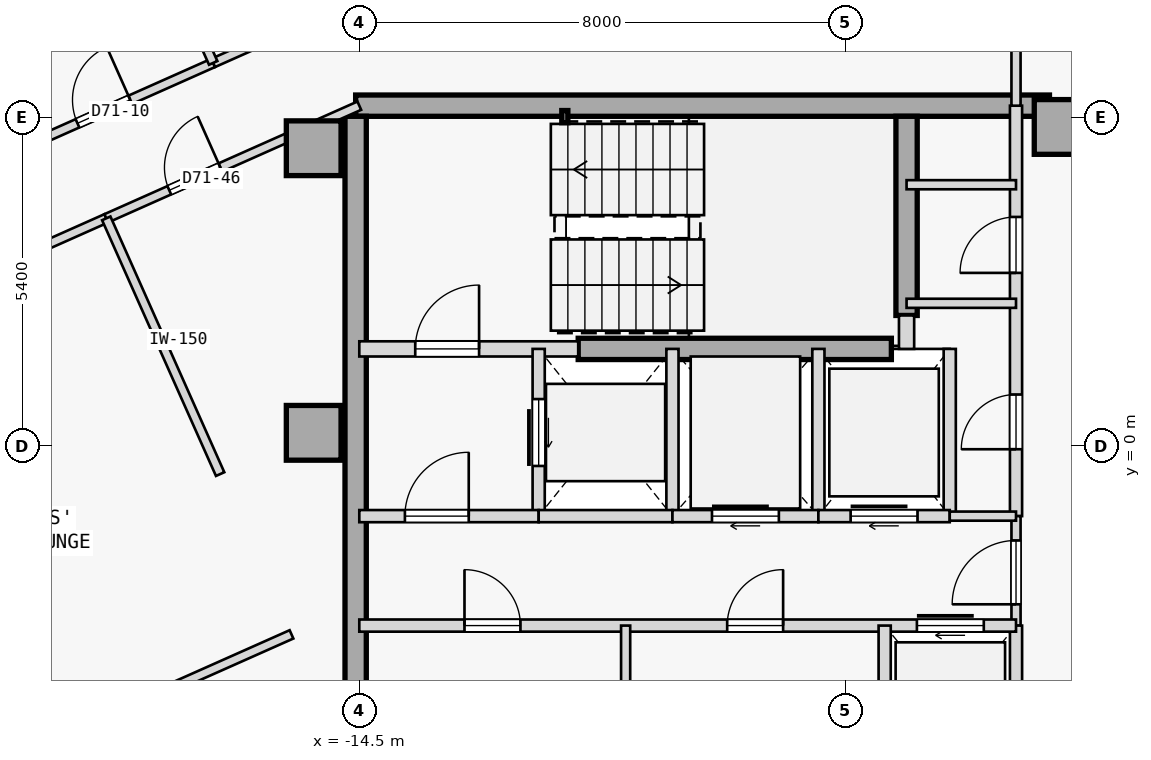
"""IFC4 building model, lengths in metres.
Left out: names, types, materials, properties, quantities, classifications, styles, units other than length and angle.
Written with IfcOpenShell. Run it as: python <this file> out.ifc"""

import sys

from ifc_helpers import new_model, si_unit, direction, frame, frame_2d, origin, origin_2d, place, context, subcontext, project, spatial, rectangle, hollow_rectangle, extrude, element, fill, save


model = new_model("IFC4")
c1 = context("Model", 3, precision=1e-05, world=origin(), true_north=direction((0.0, 1.0)))
c2 = subcontext(c1, "Body", "Model", "MODEL_VIEW")
j1 = project(units=[si_unit("LENGTHUNIT", "METRE"), si_unit("PLANEANGLEUNIT", "RADIAN")], contexts=[c1])
p1 = place(None, origin())
s1 = spatial("IfcSite", under=j1, at=p1, CompositionType="ELEMENT")
p2 = place(p1, origin())
s2 = spatial("IfcBuilding", under=s1, at=p2, CompositionType="ELEMENT")
p3 = place(p2, frame((0.0, 0.0, 265.55)))
s3 = spatial("IfcBuildingStorey", under=s2, at=p3, CompositionType="ELEMENT", Elevation=265.55)
for number, where, z_axis, x_axis in (
    (1, (-15.25, 4.9, 0.0), (0.0, 0.0, 1.0), (1.0, 0.0, 0.0)),
    (2, (-15.25, 0.22, 0.0), (0.0, 0.0, 1.0), (1.0, 0.0, 0.0)),
    (3, (-2.95, 5.25, 0.0), (0.0, 0.0, 1.0), (1.0, 0.0, 0.0)),
):
    element("IfcColumn", number, at=place(p3, frame(where, z_axis=z_axis, x_axis=x_axis)), inside=s3, PredefinedType="COLUMN", context=c2, shape_type="SweptSolid", body=[
        extrude(rectangle(XDim=0.9, YDim=0.9, at=origin_2d()), origin(), (0.0, 0.0, 1.0), 3.35),
    ])
p4 = place(p3, frame((-14.56, 5.6, 0.0), z_axis=(0.0, 0.0, 1.0), x_axis=(1.0, 0.0, 0.0)))
e4 = element("IfcWall", 4, at=p4, inside=s3, PredefinedType="SHEAR", context=c2, shape_type="SweptSolid", body=[
    extrude(rectangle(XDim=11.41, YDim=0.35, at=frame_2d((5.705, 0.0))), origin(), (0.0, 0.0, 1.0), 3.125),
])
p5 = place(p3, frame((-14.56, -5.425, 0.0), z_axis=(0.0, 0.0, 1.0), x_axis=(0.0, 1.0, 0.0)))
e5 = element("IfcWall", 5, at=p5, inside=s3, PredefinedType="SHEAR", context=c2, shape_type="SweptSolid", body=[
    extrude(rectangle(XDim=10.85, YDim=0.35, at=frame_2d((5.425, 0.0))), origin(), (0.0, 0.0, 1.0), 3.125),
])
p6 = place(p3, frame((-5.5, 2.15, 0.0), z_axis=(0.0, 0.0, 1.0), x_axis=(0.0, 1.0, 0.0)))
e6 = element("IfcWall", 6, at=p6, inside=s3, PredefinedType="SHEAR", context=c2, shape_type="SweptSolid", body=[
    extrude(rectangle(XDim=3.275, YDim=0.35, at=frame_2d((1.638, 0.0))), origin(), (0.0, 0.0, 1.0), 3.125),
])
p7 = place(p3, frame((-10.9, 1.6, 0.0), z_axis=(0.0, 0.0, 1.0), x_axis=(1.0, 0.0, 0.0)))
e7 = element("IfcWall", 7, at=p7, inside=s3, PredefinedType="SHEAR", context=c2, shape_type="SweptSolid", body=[
    extrude(rectangle(XDim=5.15, YDim=0.35, at=frame_2d((2.575, 0.0))), origin(), (0.0, 0.0, 1.0), 3.125),
])
p8 = place(p3, frame((-11.12, 5.42, 0.0), z_axis=(0.0, 0.0, 1.0), x_axis=(1.0, 0.0, 0.0)))
e8 = element("IfcColumn", 8, at=p8, inside=s3, PredefinedType="COLUMN", context=c2, shape_type="SweptSolid", body=[
    extrude(hollow_rectangle(XDim=0.1, YDim=0.2, WallThickness=0.008, at=origin_2d()), origin(), (0.0, 0.0, 1.0), 3.35),
])
p9 = place(p3, frame((-14.5, 1.6, 0.0), z_axis=(0.0, 0.0, 1.0), x_axis=(1.0, 0.0, 0.0)))
e9 = element("IfcWall", 9, at=p9, inside=s3, PredefinedType="STANDARD", context=c2, shape_type="SweptSolid", body=[
    extrude(rectangle(XDim=3.6, YDim=0.25, at=frame_2d((1.8, 0.0))), origin(), (0.0, 0.0, 1.0), 3.125),
])
p10 = place(p9, frame((0.92, 0.0, 0.0)))
e10 = element("IfcOpeningElement", 10, at=p10, cuts=e9, PredefinedType="OPENING", context=c2, shape_type="SweptSolid", body=[
    extrude(rectangle(XDim=1.05, YDim=2.15, at=frame_2d((0.525, 1.075))), frame((0.0, 0.135, 0.0), z_axis=(0.0, -1.0, 0.0), x_axis=(1.0, 0.0, 0.0)), (0.0, 0.0, 1.0), 0.27),
])
p11 = place(p3, frame((-5.5, 1.6, 0.0), z_axis=(0.0, 0.0, 1.0), x_axis=(0.0, 1.0, 0.0)))
e11 = element("IfcWall", 11, at=p11, inside=s3, PredefinedType="STANDARD", context=c2, shape_type="SweptSolid", body=[
    extrude(rectangle(XDim=0.55, YDim=0.25, at=frame_2d((0.275, 0.0))), origin(), (0.0, 0.0, 1.0), 3.125),
])
p12 = place(p3, frame((-3.7, -1.15, 0.0), z_axis=(0.0, 0.0, 1.0), x_axis=(0.0, 1.0, 0.0)))
e12 = element("IfcWall", 12, at=p12, inside=s3, PredefinedType="STANDARD", context=c2, shape_type="SweptSolid", body=[
    extrude(rectangle(XDim=6.75, YDim=0.2, at=frame_2d((3.375, 0.0))), origin(), (0.0, 0.0, 1.0), 3.125),
])
p13 = place(p12, frame((1.1, 0.0, 0.0)))
e13 = element("IfcOpeningElement", 13, at=p13, cuts=e12, PredefinedType="OPENING", context=c2, shape_type="SweptSolid", body=[
    extrude(rectangle(XDim=0.9, YDim=2.15, at=frame_2d((0.45, 1.075))), frame((0.0, 0.11, 0.0), z_axis=(0.0, -1.0, 0.0), x_axis=(1.0, 0.0, 0.0)), (0.0, 0.0, 1.0), 0.22),
])
p14 = place(p12, frame((4.0, 0.0, 0.0)))
e14 = element("IfcOpeningElement", 14, at=p14, cuts=e12, PredefinedType="OPENING", context=c2, shape_type="SweptSolid", body=[
    extrude(rectangle(XDim=0.92, YDim=2.15, at=frame_2d((0.46, 1.075))), frame((0.0, 0.11, 0.0), z_axis=(0.0, -1.0, 0.0), x_axis=(1.0, 0.0, 0.0)), (0.0, 0.0, 1.0), 0.22),
])
p15 = place(p3, frame((-3.7, -2.95, 0.0), z_axis=(0.0, 0.0, 1.0), x_axis=(0.0, 1.0, 0.0)))
e15 = element("IfcWall", 15, at=p15, inside=s3, PredefinedType="PARTITIONING", context=c2, shape_type="SweptSolid", body=[
    extrude(rectangle(XDim=1.8, YDim=0.15, at=frame_2d((0.9, 0.0))), origin(), (0.0, 0.0, 1.0), 3.125),
])
p16 = place(p15, frame((0.35, 0.0, 0.0)))
e16 = element("IfcOpeningElement", 16, at=p16, cuts=e15, PredefinedType="OPENING", context=c2, shape_type="SweptSolid", body=[
    extrude(rectangle(XDim=1.05, YDim=2.18, at=frame_2d((0.525, 1.09))), frame((0.0, 0.085, 0.0), z_axis=(0.0, -1.0, 0.0), x_axis=(1.0, 0.0, 0.0)), (0.0, 0.0, 1.0), 0.17),
])
p17 = place(p3, frame((-3.7, -5.6, 0.0), z_axis=(0.0, 0.0, 1.0), x_axis=(0.0, 1.0, 0.0)))
e17 = element("IfcWall", 17, at=p17, inside=s3, PredefinedType="STANDARD", context=c2, shape_type="SweptSolid", body=[
    extrude(rectangle(XDim=2.65, YDim=0.2, at=frame_2d((1.325, 0.0))), origin(), (0.0, 0.0, 1.0), 3.125),
])
p18 = place(p3, frame((-11.55, -1.15, 0.0), z_axis=(0.0, 0.0, 1.0), x_axis=(0.0, 1.0, 0.0)))
e18 = element("IfcWall", 18, at=p18, inside=s3, PredefinedType="STANDARD", context=c2, shape_type="SweptSolid", body=[
    extrude(rectangle(XDim=2.75, YDim=0.2, at=frame_2d((1.375, 0.0))), origin(), (0.0, 0.0, 1.0), 3.125),
])
p19 = place(p18, frame((0.825, 0.0, 0.0)))
e19 = element("IfcOpeningElement", 19, at=p19, cuts=e18, PredefinedType="OPENING", context=c2, shape_type="SweptSolid", body=[
    extrude(rectangle(XDim=1.1, YDim=2.15, at=frame_2d((0.55, 1.075))), frame((0.0, 0.11, 0.0), z_axis=(0.0, -1.0, 0.0), x_axis=(1.0, 0.0, 0.0)), (0.0, 0.0, 1.0), 0.22),
])
p20 = place(p3, frame((-9.35, -1.15, 0.0), z_axis=(0.0, 0.0, 1.0), x_axis=(0.0, 1.0, 0.0)))
e20 = element("IfcWall", 20, at=p20, inside=s3, PredefinedType="STANDARD", context=c2, shape_type="SweptSolid", body=[
    extrude(rectangle(XDim=2.75, YDim=0.2, at=frame_2d((1.375, 0.0))), origin(), (0.0, 0.0, 1.0), 3.125),
])
p21 = place(p3, frame((-14.5, -1.15, 0.0), z_axis=(0.0, 0.0, 1.0), x_axis=(1.0, 0.0, 0.0)))
e21 = element("IfcWall", 21, at=p21, inside=s3, PredefinedType="STANDARD", context=c2, shape_type="SweptSolid", body=[
    extrude(rectangle(XDim=2.95, YDim=0.2, at=frame_2d((1.475, 0.0))), origin(), (0.0, 0.0, 1.0), 3.125),
])
p22 = place(p21, frame((0.75, 0.0, 0.0)))
e22 = element("IfcOpeningElement", 22, at=p22, cuts=e21, PredefinedType="OPENING", context=c2, shape_type="SweptSolid", body=[
    extrude(rectangle(XDim=1.05, YDim=2.18, at=frame_2d((0.525, 1.09))), frame((0.0, 0.11, 0.0), z_axis=(0.0, -1.0, 0.0), x_axis=(1.0, 0.0, 0.0)), (0.0, 0.0, 1.0), 0.22),
])
p23 = place(p3, frame((-11.55, -1.15, 0.0), z_axis=(0.0, 0.0, 1.0), x_axis=(1.0, 0.0, 0.0)))
e23 = element("IfcWall", 23, at=p23, inside=s3, PredefinedType="STANDARD", context=c2, shape_type="SweptSolid", body=[
    extrude(rectangle(XDim=2.2, YDim=0.2, at=frame_2d((1.1, 0.0))), origin(), (0.0, 0.0, 1.0), 3.125),
])
p24 = place(p3, frame((-6.95, -1.15, 0.0), z_axis=(0.0, 0.0, 1.0), x_axis=(0.0, 1.0, 0.0)))
e24 = element("IfcWall", 24, at=p24, inside=s3, PredefinedType="STANDARD", context=c2, shape_type="SweptSolid", body=[
    extrude(rectangle(XDim=2.75, YDim=0.2, at=frame_2d((1.375, 0.0))), origin(), (0.0, 0.0, 1.0), 3.125),
])
p25 = place(p3, frame((-9.35, -1.15, 0.0), z_axis=(0.0, 0.0, 1.0), x_axis=(1.0, 0.0, 0.0)))
e25 = element("IfcWall", 25, at=p25, inside=s3, PredefinedType="STANDARD", context=c2, shape_type="SweptSolid", body=[
    extrude(rectangle(XDim=2.4, YDim=0.2, at=frame_2d((1.2, 0.0))), origin(), (0.0, 0.0, 1.0), 3.125),
])
p26 = place(p25, frame((0.65, 0.0, 0.0)))
e26 = element("IfcOpeningElement", 26, at=p26, cuts=e25, PredefinedType="OPENING", context=c2, shape_type="SweptSolid", body=[
    extrude(rectangle(XDim=1.1, YDim=2.15, at=frame_2d((0.55, 1.075))), frame((0.0, 0.11, 0.0), z_axis=(0.0, -1.0, 0.0), x_axis=(1.0, 0.0, 0.0)), (0.0, 0.0, 1.0), 0.22),
])
p27 = place(p3, frame((-4.79, -1.15, 0.0), z_axis=(0.0, 0.0, 1.0), x_axis=(0.0, 1.0, 0.0)))
e27 = element("IfcWall", 27, at=p27, inside=s3, PredefinedType="STANDARD", context=c2, shape_type="SweptSolid", body=[
    extrude(rectangle(XDim=2.75, YDim=0.2, at=frame_2d((1.375, 0.0))), origin(), (0.0, 0.0, 1.0), 3.125),
])
p28 = place(p3, frame((-6.95, -1.15, 0.0), z_axis=(0.0, 0.0, 1.0), x_axis=(1.0, 0.0, 0.0)))
e28 = element("IfcWall", 28, at=p28, inside=s3, PredefinedType="STANDARD", context=c2, shape_type="SweptSolid", body=[
    extrude(rectangle(XDim=2.16, YDim=0.2, at=frame_2d((1.08, 0.0))), origin(), (0.0, 0.0, 1.0), 3.125),
])
p29 = place(p28, frame((0.53, 0.0, 0.0)))
e29 = element("IfcOpeningElement", 29, at=p29, cuts=e28, PredefinedType="OPENING", context=c2, shape_type="SweptSolid", body=[
    extrude(rectangle(XDim=1.1, YDim=2.15, at=frame_2d((0.55, 1.075))), frame((0.0, 0.11, 0.0), z_axis=(0.0, -1.0, 0.0), x_axis=(1.0, 0.0, 0.0)), (0.0, 0.0, 1.0), 0.22),
])
p30 = place(p3, frame((-4.79, -1.15, 0.0), z_axis=(0.0, 0.0, 1.0), x_axis=(1.0, 0.0, 0.0)))
e30 = element("IfcWall", 30, at=p30, inside=s3, PredefinedType="PARTITIONING", context=c2, shape_type="SweptSolid", body=[
    extrude(rectangle(XDim=1.09, YDim=0.15, at=frame_2d((0.545, 0.0))), origin(), (0.0, 0.0, 1.0), 3.125),
])
p31 = place(p3, frame((-14.5, -2.95, 0.0), z_axis=(0.0, 0.0, 1.0), x_axis=(1.0, 0.0, 0.0)))
e31 = element("IfcWall", 31, at=p31, inside=s3, PredefinedType="STANDARD", context=c2, shape_type="SweptSolid", body=[
    extrude(rectangle(XDim=10.8, YDim=0.2, at=frame_2d((5.4, 0.0))), origin(), (0.0, 0.0, 1.0), 3.125),
])
p32 = place(p31, frame((9.17, 0.0, 0.0)))
e32 = element("IfcOpeningElement", 32, at=p32, cuts=e31, PredefinedType="OPENING", context=c2, shape_type="SweptSolid", body=[
    extrude(rectangle(XDim=1.1, YDim=2.15, at=frame_2d((0.55, 1.075))), frame((0.0, 0.11, 0.0), z_axis=(0.0, -1.0, 0.0), x_axis=(1.0, 0.0, 0.0)), (0.0, 0.0, 1.0), 0.22),
])
p33 = place(p31, frame((1.73, 0.0, 0.0)))
e33 = element("IfcOpeningElement", 33, at=p33, cuts=e31, PredefinedType="OPENING", context=c2, shape_type="SweptSolid", body=[
    extrude(rectangle(XDim=0.92, YDim=2.15, at=frame_2d((0.46, 1.075))), frame((0.0, 0.11, 0.0), z_axis=(0.0, -1.0, 0.0), x_axis=(1.0, 0.0, 0.0)), (0.0, 0.0, 1.0), 0.22),
])
p34 = place(p31, frame((6.05, 0.0, 0.0)))
e34 = element("IfcOpeningElement", 34, at=p34, cuts=e31, PredefinedType="OPENING", context=c2, shape_type="SweptSolid", body=[
    extrude(rectangle(XDim=0.92, YDim=2.15, at=frame_2d((0.46, 1.075))), frame((0.0, 0.11, 0.0), z_axis=(0.0, -1.0, 0.0), x_axis=(1.0, 0.0, 0.0)), (0.0, 0.0, 1.0), 0.22),
])
p35 = place(p3, frame((-5.86, -5.6, 0.0), z_axis=(0.0, 0.0, 1.0), x_axis=(0.0, 1.0, 0.0)))
e35 = element("IfcWall", 35, at=p35, inside=s3, PredefinedType="STANDARD", context=c2, shape_type="SweptSolid", body=[
    extrude(rectangle(XDim=2.65, YDim=0.2, at=frame_2d((1.325, 0.0))), origin(), (0.0, 0.0, 1.0), 3.125),
])
p36 = place(p3, frame((-10.12, -5.6, 0.0), z_axis=(0.0, 0.0, 1.0), x_axis=(0.0, 1.0, 0.0)))
e36 = element("IfcWall", 36, at=p36, inside=s3, PredefinedType="PARTITIONING", context=c2, shape_type="SweptSolid", body=[
    extrude(rectangle(XDim=2.65, YDim=0.15, at=frame_2d((1.325, 0.0))), origin(), (0.0, 0.0, 1.0), 3.125),
])
for number, where, z_axis, x_axis in (
    (37, (-5.5, 4.3, 0.0), (0.0, 0.0, 1.0), (1.0, 0.0, 0.0)),
    (38, (-5.5, 2.35, 0.0), (0.0, 0.0, 1.0), (1.0, 0.0, 0.0)),
):
    element("IfcWall", number, at=place(p3, frame(where, z_axis=z_axis, x_axis=x_axis)), inside=s3, PredefinedType="PARTITIONING", context=c2, shape_type="SweptSolid", body=[
        extrude(rectangle(XDim=1.8, YDim=0.15, at=frame_2d((0.9, 0.0))), origin(), (0.0, 0.0, 1.0), 3.125),
    ])
p37 = place(p3, frame((-20.499, 4.702, 0.0), z_axis=(0.0, 0.0, 1.0), x_axis=(0.913553019012, 0.406719659537, 0.0)))
e39 = element("IfcWall", 39, at=p37, inside=s3, PredefinedType="PARTITIONING", context=c2, shape_type="SweptSolid", body=[
    extrude(rectangle(XDim=3.936, YDim=0.15, at=frame_2d((1.968, 0.0))), origin(), (0.0, 0.0, 1.0), 3.125),
])
p38 = place(p37, frame((1.493, 0.0, 0.0)))
e40 = element("IfcOpeningElement", 40, at=p38, cuts=e39, PredefinedType="OPENING", context=c2, shape_type="SweptSolid", body=[
    extrude(rectangle(XDim=0.95, YDim=2.15, at=frame_2d((0.475, 1.075))), frame((0.0, 0.085, 0.0), z_axis=(0.0, -1.0, 0.0), x_axis=(1.0, 0.0, 0.0)), (0.0, 0.0, 1.0), 0.17),
])
p39 = place(p3, frame((-16.903, 6.303, 0.0), z_axis=(0.0, 0.0, 1.0), x_axis=(0.913543802, 0.40674036169, 0.0)))
e41 = element("IfcWall", 41, at=p39, inside=s3, PredefinedType="PARTITIONING", context=c2, shape_type="SweptSolid", body=[
    extrude(rectangle(XDim=3.65, YDim=0.15, at=frame_2d((1.825, 0.0))), origin(), (0.0, 0.0, 1.0), 3.125),
])
p40 = place(p3, frame((-29.404, -1.036, 0.0), z_axis=(0.0, 0.0, 1.0), x_axis=(0.913544247064, 0.406739362069, 0.0)))
e42 = element("IfcWall", 42, at=p40, inside=s3, PredefinedType="PARTITIONING", context=c2, shape_type="SweptSolid", body=[
    extrude(rectangle(XDim=11.76, YDim=0.15, at=frame_2d((5.88, 0.0))), origin(), (0.0, 0.0, 1.0), 3.125),
])
p41 = place(p40, frame((5.42, 0.0, 0.0)))
e43 = element("IfcOpeningElement", 43, at=p41, cuts=e42, PredefinedType="OPENING", context=c2, shape_type="SweptSolid", body=[
    extrude(rectangle(XDim=0.92, YDim=2.15, at=frame_2d((0.46, 1.075))), frame((0.0, 0.085, 0.0), z_axis=(0.0, -1.0, 0.0), x_axis=(1.0, 0.0, 0.0)), (0.0, 0.0, 1.0), 0.17),
])
p42 = place(p3, frame((-18.661, 3.747, 0.0), z_axis=(0.0, 0.0, 1.0), x_axis=(0.913535055583, 0.40676000568, 0.0)))
e44 = element("IfcWall", 44, at=p42, inside=s3, PredefinedType="PARTITIONING", context=c2, shape_type="SweptSolid", body=[
    extrude(rectangle(XDim=4.555, YDim=0.15, at=frame_2d((2.277, 0.0))), origin(), (0.0, 0.0, 1.0), 3.125),
])
p43 = place(p42, frame((1.134, 0.0, 0.0)))
e45 = element("IfcOpeningElement", 45, at=p43, cuts=e44, PredefinedType="OPENING", context=c2, shape_type="SweptSolid", body=[
    extrude(rectangle(XDim=0.92, YDim=2.15, at=frame_2d((0.46, 1.075))), frame((0.0, 0.085, 0.0), z_axis=(0.0, -1.0, 0.0), x_axis=(1.0, 0.0, 0.0)), (0.0, 0.0, 1.0), 0.17),
])
p44 = place(p3, frame((-3.7, 5.6, 0.0), z_axis=(0.0, 0.0, 1.0), x_axis=(5.077173e-05, 0.999999998711, 0.0)))
e46 = element("IfcWall", 46, at=p44, inside=s3, PredefinedType="PARTITIONING", context=c2, shape_type="SweptSolid", body=[
    extrude(rectangle(XDim=4.809, YDim=0.15, at=frame_2d((2.404, 0.0))), origin(), (0.0, 0.0, 1.0), 3.125),
])
p45 = place(p3, frame((-16.903, 6.303, 0.0), z_axis=(0.0, 0.0, 1.0), x_axis=(-0.406733350739, 0.913546923478, 0.0)))
e47 = element("IfcWall", 47, at=p45, inside=s3, PredefinedType="PARTITIONING", context=c2, shape_type="SweptSolid", body=[
    extrude(rectangle(XDim=3.198, YDim=0.15, at=frame_2d((1.599, 0.0))), origin(), (0.0, 0.0, 1.0), 3.125),
])
p46 = place(p3, frame((-26.358, -7.878, 0.0), z_axis=(0.0, 0.0, 1.0), x_axis=(0.913547681516, 0.406731648137, 0.0)))
e48 = element("IfcWall", 48, at=p46, inside=s3, PredefinedType="PARTITIONING", context=c2, shape_type="SweptSolid", body=[
    extrude(rectangle(XDim=11.76, YDim=0.15, at=frame_2d((5.88, 0.0))), origin(), (0.0, 0.0, 1.0), 3.125),
])
p47 = place(p3, frame((-16.789, -0.459, 0.0), z_axis=(0.0, 0.0, 1.0), x_axis=(-0.406738654026, 0.913544562307, 0.0)))
e49 = element("IfcWall", 49, at=p47, inside=s3, PredefinedType="PARTITIONING", context=c2, shape_type="SweptSolid", body=[
    extrude(rectangle(XDim=4.604, YDim=0.15, at=frame_2d((2.302, 0.0))), origin(), (0.0, 0.0, 1.0), 3.125),
])
p48 = place(p10, origin())
e50 = element("IfcDoor", 50, at=p48, inside=s3, OperationType="SINGLE_SWING_RIGHT", PredefinedType="DOOR", context=c2, shape_type="SweptSolid", body=[
    extrude(rectangle(XDim=1.05, YDim=2.15, at=frame_2d((0.525, 1.075))), frame((0.0, 0.025, 0.0), z_axis=(0.0, -1.0, 0.0), x_axis=(1.0, 0.0, 0.0)), (0.0, 0.0, 1.0), 0.05),
])
fill(e10, e50)
p49 = place(p22, origin())
e51 = element("IfcDoor", 51, at=p49, inside=s3, OperationType="SINGLE_SWING_RIGHT", PredefinedType="DOOR", context=c2, shape_type="SweptSolid", body=[
    extrude(rectangle(XDim=1.05, YDim=2.18, at=frame_2d((0.525, 1.09))), frame((0.0, 0.025, 0.0), z_axis=(0.0, -1.0, 0.0), x_axis=(1.0, 0.0, 0.0)), (0.0, 0.0, 1.0), 0.05),
])
fill(e22, e51)
p50 = place(p16, origin())
e52 = element("IfcDoor", 52, at=p50, inside=s3, OperationType="SINGLE_SWING_LEFT", PredefinedType="DOOR", context=c2, shape_type="SweptSolid", body=[
    extrude(rectangle(XDim=1.05, YDim=2.18, at=frame_2d((0.525, 1.09))), frame((0.0, 0.025, 0.0), z_axis=(0.0, -1.0, 0.0), x_axis=(1.0, 0.0, 0.0)), (0.0, 0.0, 1.0), 0.05),
])
fill(e16, e52)
p51 = place(p19, origin())
e53 = element("IfcDoor", 53, at=p51, inside=s3, OperationType="SLIDING_TO_RIGHT", PredefinedType="DOOR", context=c2, shape_type="SweptSolid", body=[
    extrude(rectangle(XDim=1.1, YDim=2.15, at=frame_2d((0.55, 1.075))), frame((0.0, 0.025, 0.0), z_axis=(0.0, -1.0, 0.0), x_axis=(1.0, 0.0, 0.0)), (0.0, 0.0, 1.0), 0.05),
])
fill(e19, e53)
p52 = place(p26, origin())
e54 = element("IfcDoor", 54, at=p52, inside=s3, OperationType="SLIDING_TO_RIGHT", PredefinedType="DOOR", context=c2, shape_type="SweptSolid", body=[
    extrude(rectangle(XDim=1.1, YDim=2.15, at=frame_2d((0.55, 1.075))), frame((0.0, 0.025, 0.0), z_axis=(0.0, -1.0, 0.0), x_axis=(1.0, 0.0, 0.0)), (0.0, 0.0, 1.0), 0.05),
])
fill(e26, e54)
p53 = place(p29, origin())
e55 = element("IfcDoor", 55, at=p53, inside=s3, OperationType="SLIDING_TO_RIGHT", PredefinedType="DOOR", context=c2, shape_type="SweptSolid", body=[
    extrude(rectangle(XDim=1.1, YDim=2.15, at=frame_2d((0.55, 1.075))), frame((0.0, 0.025, 0.0), z_axis=(0.0, -1.0, 0.0), x_axis=(1.0, 0.0, 0.0)), (0.0, 0.0, 1.0), 0.05),
])
fill(e29, e55)
p54 = place(p32, origin())
e56 = element("IfcDoor", 56, at=p54, inside=s3, OperationType="SLIDING_TO_RIGHT", PredefinedType="DOOR", context=c2, shape_type="SweptSolid", body=[
    extrude(rectangle(XDim=1.1, YDim=2.15, at=frame_2d((0.55, 1.075))), frame((0.0, 0.025, 0.0), z_axis=(0.0, -1.0, 0.0), x_axis=(1.0, 0.0, 0.0)), (0.0, 0.0, 1.0), 0.05),
])
fill(e32, e56)
p55 = place(p33, origin())
e57 = element("IfcDoor", 57, at=p55, inside=s3, OperationType="SINGLE_SWING_LEFT", PredefinedType="DOOR", context=c2, shape_type="SweptSolid", body=[
    extrude(rectangle(XDim=0.92, YDim=2.15, at=frame_2d((0.46, 1.075))), frame((0.0, 0.025, 0.0), z_axis=(0.0, -1.0, 0.0), x_axis=(1.0, 0.0, 0.0)), (0.0, 0.0, 1.0), 0.05),
])
fill(e33, e57)
p56 = place(p34, origin())
e58 = element("IfcDoor", 58, at=p56, inside=s3, OperationType="SINGLE_SWING_RIGHT", PredefinedType="DOOR", context=c2, shape_type="SweptSolid", body=[
    extrude(rectangle(XDim=0.92, YDim=2.15, at=frame_2d((0.46, 1.075))), frame((0.0, 0.025, 0.0), z_axis=(0.0, -1.0, 0.0), x_axis=(1.0, 0.0, 0.0)), (0.0, 0.0, 1.0), 0.05),
])
fill(e34, e58)
p57 = place(p13, origin())
e59 = element("IfcDoor", 59, at=p57, inside=s3, OperationType="SINGLE_SWING_LEFT", PredefinedType="DOOR", context=c2, shape_type="SweptSolid", body=[
    extrude(rectangle(XDim=0.9, YDim=2.15, at=frame_2d((0.45, 1.075))), frame((0.0, 0.025, 0.0), z_axis=(0.0, -1.0, 0.0), x_axis=(1.0, 0.0, 0.0)), (0.0, 0.0, 1.0), 0.05),
])
fill(e13, e59)
p58 = place(p14, origin())
e60 = element("IfcDoor", 60, at=p58, inside=s3, OperationType="SINGLE_SWING_LEFT", PredefinedType="DOOR", context=c2, shape_type="SweptSolid", body=[
    extrude(rectangle(XDim=0.92, YDim=2.15, at=frame_2d((0.46, 1.075))), frame((0.0, 0.025, 0.0), z_axis=(0.0, -1.0, 0.0), x_axis=(1.0, 0.0, 0.0)), (0.0, 0.0, 1.0), 0.05),
])
fill(e14, e60)
p59 = place(p38, origin())
e61 = element("IfcDoor", 61, at=p59, inside=s3, OperationType="SINGLE_SWING_RIGHT", PredefinedType="DOOR", context=c2, shape_type="SweptSolid", body=[
    extrude(rectangle(XDim=0.95, YDim=2.15, at=frame_2d((0.475, 1.075))), frame((0.0, 0.025, 0.0), z_axis=(0.0, -1.0, 0.0), x_axis=(1.0, 0.0, 0.0)), (0.0, 0.0, 1.0), 0.05),
])
fill(e40, e61)
p60 = place(p43, origin())
e62 = element("IfcDoor", 62, at=p60, inside=s3, OperationType="SINGLE_SWING_RIGHT", PredefinedType="DOOR", context=c2, shape_type="SweptSolid", body=[
    extrude(rectangle(XDim=0.92, YDim=2.15, at=frame_2d((0.46, 1.075))), frame((0.0, 0.025, 0.0), z_axis=(0.0, -1.0, 0.0), x_axis=(1.0, 0.0, 0.0)), (0.0, 0.0, 1.0), 0.05),
])
fill(e45, e62)
save(model, sys.argv[1])
